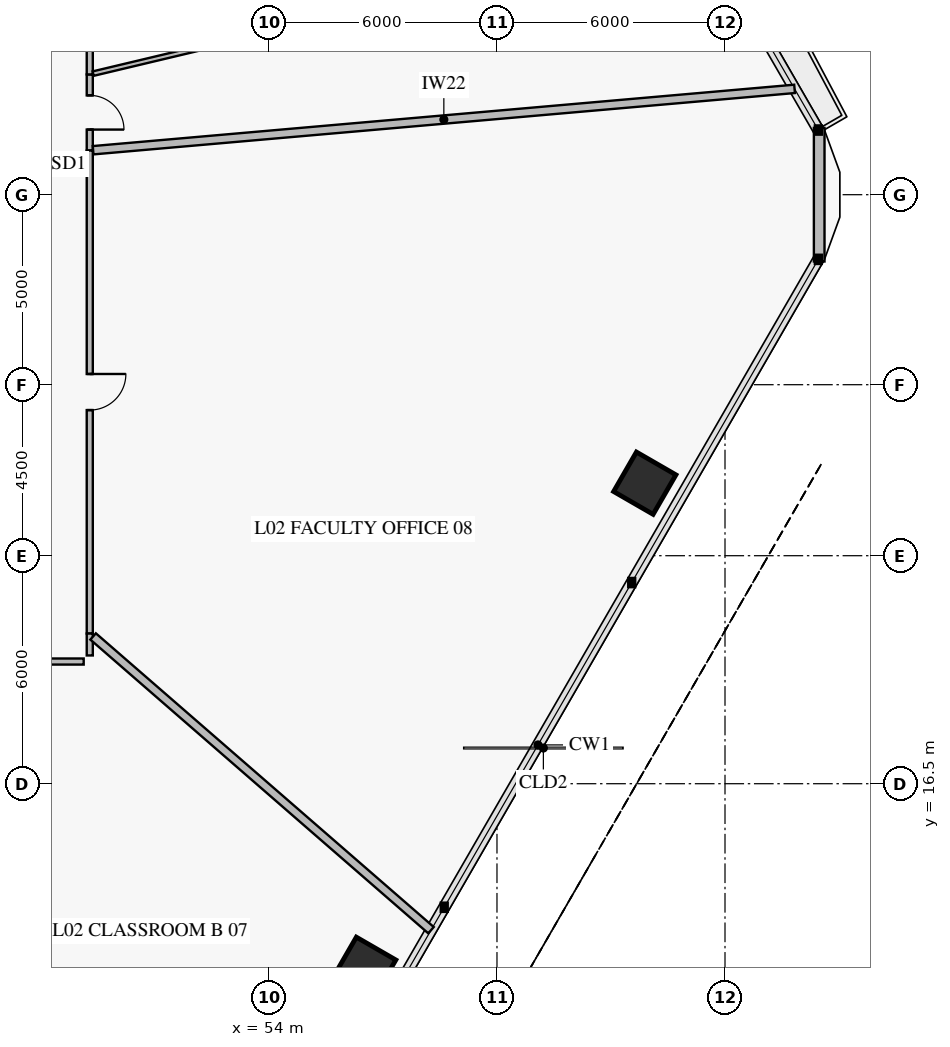
"""IFC4 building model, lengths in metres.
Left out: names, types, materials, properties, quantities, classifications, styles, units other than length and angle.
Written with IfcOpenShell. Run it as: python <this file> out.ifc"""

import sys

from ifc_helpers import new_model, si_unit, direction, frame, frame_2d, origin, origin_2d, place, context, subcontext, project, spatial, rectangle, extrude, element, fill, save


model = new_model("IFC4")
c1 = context("Model", 3, precision=1e-05, world=origin(), true_north=direction((0.0, 1.0)))
c2 = subcontext(c1, "Body", "Model", "MODEL_VIEW")
j1 = project(units=[si_unit("LENGTHUNIT", "METRE"), si_unit("PLANEANGLEUNIT", "RADIAN")], contexts=[c1])
p1 = place(None, origin())
s1 = spatial("IfcSite", under=j1, at=p1, CompositionType="ELEMENT")
p2 = place(p1, origin())
s2 = spatial("IfcBuilding", under=s1, at=p2, CompositionType="ELEMENT")
p3 = place(p2, frame((0.0, 0.0, 7.8)))
s3 = spatial("IfcBuildingStorey", under=s2, at=p3, CompositionType="ELEMENT", Elevation=7.8)
for number, where, z_axis, x_axis in (
    (1, (56.519, 11.643, 0.0), (0.0, 0.0, 1.0), (0.5, 0.866, 0.0)),
    (2, (63.889, 24.408, 0.0), (0.0, 0.0, 1.0), (0.5, 0.866, 0.0)),
):
    element("IfcColumn", number, at=place(p3, frame(where, z_axis=z_axis, x_axis=x_axis)), inside=s3, PredefinedType="COLUMN", context=c2, shape_type="SweptSolid", body=[
        extrude(rectangle(XDim=1.2, YDim=1.2, at=origin_2d()), origin(), (0.0, 0.0, 1.0), 3.92),
    ])
p4 = place(p3, frame((68.479, 33.758, 0.0), z_axis=(0.0, 0.0, 1.0), x_axis=(0.0, -1.0, 0.0)))
e3 = element("IfcWall", 3, at=p4, inside=s3, PredefinedType="SOLIDWALL", context=c2, shape_type="SweptSolid", body=[
    extrude(rectangle(XDim=3.515, YDim=0.28, at=frame_2d((1.758, 0.0))), origin(), (0.0, 0.0, 1.0), 3.92),
])
p5 = place(p3, frame((49.285, 33.162, 0.0), z_axis=(0.0, 0.0, 1.0), x_axis=(0.0, 1.0, 0.0)))
e4 = element("IfcWall", 4, at=p5, inside=s3, PredefinedType="PARTITIONING", context=c2, shape_type="SweptSolid", body=[
    extrude(rectangle(XDim=2.002, YDim=0.16, at=frame_2d((1.001, 0.0))), origin(), (0.0, 0.0, 1.0), 3.92),
])
p6 = place(p5, frame((0.551, 0.0, 0.0)))
e5 = element("IfcOpeningElement", 5, at=p6, cuts=e4, PredefinedType="OPENING", context=c2, shape_type="SweptSolid", body=[
    extrude(rectangle(XDim=0.9, YDim=2.1, at=frame_2d((0.45, 1.05))), frame((0.0, 0.092, 0.0), z_axis=(0.0, -1.0, 0.0), x_axis=(1.0, 0.0, 0.0)), (0.0, 0.0, 1.0), 0.184),
])
p7 = place(p3, frame((49.285, 35.165, 0.0), z_axis=(0.0, 0.0, 1.0), x_axis=(0.0, 1.0, 0.0)))
e6 = element("IfcWall", 6, at=p7, inside=s3, PredefinedType="PARTITIONING", context=c2, shape_type="SweptSolid", body=[
    extrude(rectangle(XDim=2.149, YDim=0.16, at=frame_2d((1.074, 0.0))), origin(), (0.0, 0.0, 1.0), 3.22),
])
p8 = place(p7, frame((0.624, 0.0, 0.0)))
e7 = element("IfcOpeningElement", 7, at=p8, cuts=e6, PredefinedType="OPENING", context=c2, shape_type="SweptSolid", body=[
    extrude(rectangle(XDim=0.9, YDim=2.1, at=frame_2d((0.45, 1.05))), frame((0.0, 0.092, 0.0), z_axis=(0.0, -1.0, 0.0), x_axis=(1.0, 0.0, 0.0)), (0.0, 0.0, 1.0), 0.184),
])
p9 = place(p3, frame((41.992, 19.715, 0.0), z_axis=(0.0, 0.0, 1.0), x_axis=(1.0, 0.0, 0.0)))
e8 = element("IfcWall", 8, at=p9, inside=s3, PredefinedType="PARTITIONING", context=c2, shape_type="SweptSolid", body=[
    extrude(rectangle(XDim=7.133, YDim=0.16, at=frame_2d((3.567, 0.0))), origin(), (0.0, 0.0, 1.0), 3.22),
])
p10 = place(p9, frame((2.992, 0.0, 0.0)))
e9 = element("IfcOpeningElement", 9, at=p10, cuts=e8, PredefinedType="OPENING", context=c2, shape_type="SweptSolid", body=[
    extrude(rectangle(XDim=1.15, YDim=2.2, at=frame_2d((0.575, 1.1))), frame((0.0, 0.092, 0.0), z_axis=(0.0, -1.0, 0.0), x_axis=(1.0, 0.0, 0.0)), (0.0, 0.0, 1.0), 0.184),
])
p11 = place(p3, frame((49.285, 20.451, 0.0), z_axis=(0.0, 0.0, 1.0), x_axis=(0.0, 1.0, 0.0)))
e10 = element("IfcWall", 10, at=p11, inside=s3, PredefinedType="PARTITIONING", context=c2, shape_type="SweptSolid", body=[
    extrude(rectangle(XDim=12.711, YDim=0.16, at=frame_2d((6.355, 0.0))), origin(), (0.0, 0.0, 1.0), 3.22),
])
p12 = place(p11, frame((5.88, 0.0, 0.0)))
e11 = element("IfcOpeningElement", 11, at=p12, cuts=e10, PredefinedType="OPENING", context=c2, shape_type="SweptSolid", body=[
    extrude(rectangle(XDim=0.95, YDim=2.1, at=frame_2d((0.475, 1.05))), frame((0.0, 0.092, 0.0), z_axis=(0.0, -1.0, 0.0), x_axis=(1.0, 0.0, 0.0)), (0.0, 0.0, 1.0), 0.184),
])
p13 = place(p3, frame((49.373, 33.17, 0.0), z_axis=(0.0, 0.0, 1.0), x_axis=(0.99619391773, 0.087164661858, 0.0)))
e12 = element("IfcWall", 12, at=p13, inside=s3, PredefinedType="PARTITIONING", context=c2, shape_type="SweptSolid", body=[
    extrude(rectangle(XDim=18.528, YDim=0.22, at=frame_2d((9.264, 0.0))), origin(), (0.0, 0.0, 1.0), 3.17),
])
p14 = place(p3, frame((49.373, 35.186, 0.0), z_axis=(0.0, 0.0, 1.0), x_axis=(0.972774396977, 0.231754120968, 0.0)))
e13 = element("IfcWall", 13, at=p14, inside=s3, PredefinedType="PARTITIONING", context=c2, shape_type="SweptSolid", body=[
    extrude(rectangle(XDim=16.471, YDim=0.12, at=frame_2d((8.235, 0.0))), origin(), (0.0, 0.0, 1.0), 3.17),
])
p15 = place(p3, frame((42.035, 19.627, 0.0), z_axis=(0.0, 0.0, 1.0), x_axis=(0.438375147569, -0.898792094977, 0.0)))
e14 = element("IfcWall", 14, at=p15, inside=s3, PredefinedType="PARTITIONING", context=c2, shape_type="SweptSolid", body=[
    extrude(rectangle(XDim=18.453, YDim=0.22, at=frame_2d((9.227, 0.0))), origin(), (0.0, 0.0, 1.0), 3.17),
])
p16 = place(p3, frame((49.285, 19.875, 0.0), z_axis=(0.0, 0.0, 1.0), x_axis=(0.0, 1.0, 0.0)))
e15 = element("IfcWall", 15, at=p16, inside=s3, PredefinedType="PARTITIONING", context=c2, shape_type="SweptSolid", body=[
    extrude(rectangle(XDim=0.576, YDim=0.16, at=frame_2d((0.288, 0.0))), origin(), (0.0, 0.0, 1.0), 3.92),
])
p17 = place(p3, frame((49.373, 20.375, 0.0), z_axis=(0.0, 0.0, 1.0), x_axis=(0.754715261602, -0.656052493254, 0.0)))
e16 = element("IfcWall", 16, at=p17, inside=s3, PredefinedType="PARTITIONING", context=c2, shape_type="SweptSolid", body=[
    extrude(rectangle(XDim=11.781, YDim=0.22, at=frame_2d((5.891, 0.0))), origin(), (0.0, 0.0, 1.0), 3.17),
])
p18 = place(p6, frame((0.9, 0.0, 0.0), z_axis=(0.0, 0.0, 1.0), x_axis=(-1.0, 0.0, 0.0)))
e17 = element("IfcDoor", 17, at=p18, inside=s3, OperationType="SINGLE_SWING_RIGHT", PredefinedType="DOOR", context=c2, shape_type="SweptSolid", body=[
    extrude(rectangle(XDim=0.9, YDim=2.1, at=frame_2d((0.45, 1.05))), frame((0.0, 0.025, 0.0), z_axis=(0.0, -1.0, 0.0), x_axis=(1.0, 0.0, 0.0)), (0.0, 0.0, 1.0), 0.05),
])
fill(e5, e17)
p19 = place(p12, frame((0.95, 0.0, 0.0), z_axis=(0.0, 0.0, 1.0), x_axis=(-1.0, 0.0, 0.0)))
e18 = element("IfcDoor", 18, at=p19, inside=s3, OperationType="SINGLE_SWING_LEFT", PredefinedType="DOOR", context=c2, shape_type="SweptSolid", body=[
    extrude(rectangle(XDim=0.95, YDim=2.1, at=frame_2d((0.475, 1.05))), frame((0.0, 0.025, 0.0), z_axis=(0.0, -1.0, 0.0), x_axis=(1.0, 0.0, 0.0)), (0.0, 0.0, 1.0), 0.05),
])
fill(e11, e18)
save(model, sys.argv[1])
